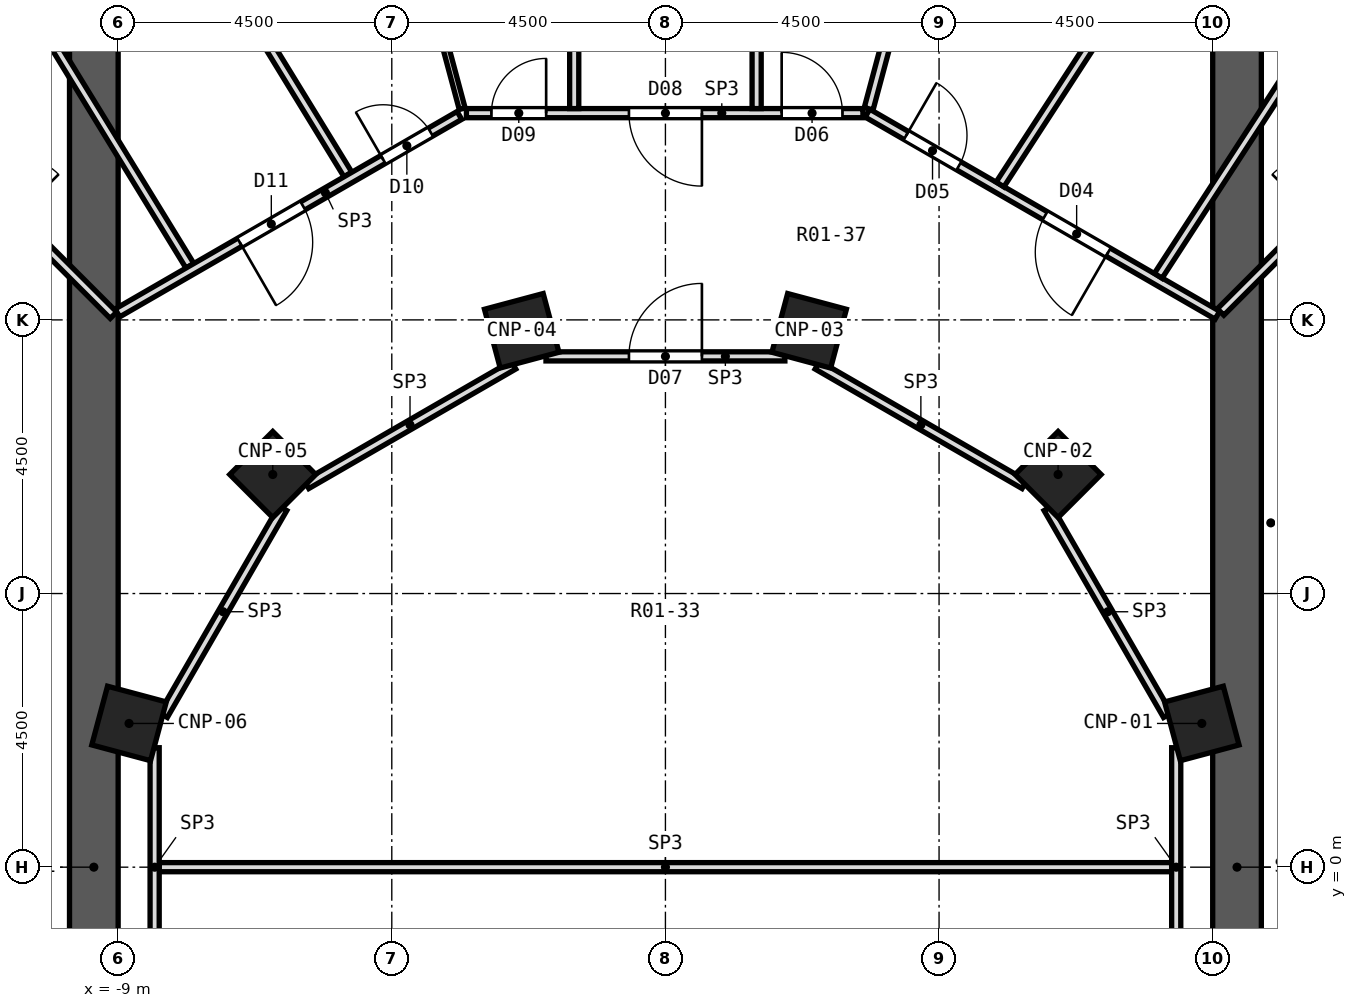
"""IFC4 building model, lengths in metres.
Left out: names, types, materials, properties, quantities, classifications, styles, units other than length and angle.
Written with IfcOpenShell. Run it as: python <this file> out.ifc"""

import sys

from ifc_helpers import new_model, si_unit, direction, frame, frame_2d, origin, origin_2d, place, context, subcontext, project, spatial, rectangle, extrude, element, fill, save


model = new_model("IFC4")
c1 = context("Model", 3, precision=1e-05, world=origin(), true_north=direction((0.0, 1.0)))
c2 = subcontext(c1, "Body", "Model", "MODEL_VIEW")
j1 = project(units=[si_unit("LENGTHUNIT", "METRE"), si_unit("PLANEANGLEUNIT", "RADIAN")], contexts=[c1])
p1 = place(None, origin())
s1 = spatial("IfcSite", under=j1, at=p1, CompositionType="ELEMENT")
p2 = place(p1, origin())
s2 = spatial("IfcBuilding", under=s1, at=p2, CompositionType="ELEMENT")
p3 = place(p2, frame((0.0, 0.0, -9.0)))
s3 = spatial("IfcBuildingStorey", under=s2, at=p3, CompositionType="ELEMENT", Elevation=-9.0)
for number, where, z_axis, x_axis in (
    (1, (8.821, 2.364, -0.3), (0.0, 0.0, 1.0), (0.966, 0.259, 0.0)),
    (2, (6.458, 6.458, -0.3), (0.0, 0.0, 1.0), (0.707, 0.707, 0.0)),
    (3, (2.364, 8.821, -0.3), (0.0, 0.0, 1.0), (0.259, 0.966, 0.0)),
    (4, (-2.364, 8.821, -0.3), (0.0, 0.0, 1.0), (-0.259, 0.966, 0.0)),
    (5, (-6.458, 6.458, -0.3), (0.0, 0.0, 1.0), (-0.707, 0.707, 0.0)),
    (6, (-8.821, 2.364, -0.3), (0.0, 0.0, 1.0), (-0.966, 0.259, 0.0)),
):
    element("IfcColumn", number, at=place(p3, frame(where, z_axis=z_axis, x_axis=x_axis)), inside=s3, PredefinedType="COLUMN", context=c2, shape_type="SweptSolid", body=[
        extrude(rectangle(XDim=1.0, YDim=1.0, at=origin_2d()), origin(), (0.0, 0.0, 1.0), 4.8),
    ])
for number, where, z_axis, x_axis in (
    (7, (9.4, -27.077, -0.3), (0.0, 0.0, 1.0), (0.0, 1.0, 0.0)),
    (8, (-9.4, -27.077, -0.3), (0.0, 0.0, 1.0), (0.0, 1.0, 0.0)),
):
    element("IfcWall", number, at=place(p3, frame(where, z_axis=z_axis, x_axis=x_axis)), inside=s3, PredefinedType="SHEAR", context=c2, shape_type="SweptSolid", body=[
        extrude(rectangle(XDim=54.154, YDim=0.8, at=frame_2d((27.077, 0.0))), origin(), (0.0, 0.0, 1.0), 4.8),
    ])
p4 = place(p3, frame((-5.702, 21.279, 0.0), z_axis=(0.0, 0.0, 1.0), x_axis=(0.258795874203, -0.965932034615, 0.0)))
e9 = element("IfcWall", 9, at=p4, inside=s3, PredefinedType="PARTITIONING", context=c2, shape_type="SweptSolid", body=[
    extrude(rectangle(XDim=9.117, YDim=0.1, at=frame_2d((4.558, 0.0))), origin(), (0.0, 0.0, 1.0), 3.95),
])
p5 = place(p3, frame((6.292, 5.902, 0.0), z_axis=(0.0, 0.0, 1.0), x_axis=(0.500061252887, -0.865990036525, 0.0)))
e10 = element("IfcWall", 10, at=p5, inside=s3, PredefinedType="PARTITIONING", context=c2, shape_type="SweptSolid", body=[
    extrude(rectangle(XDim=3.93, YDim=0.15, at=frame_2d((1.965, 0.0))), origin(), (0.0, 0.0, 1.0), 3.95),
])
p6 = place(p3, frame((-12.795, 18.009, 0.0), z_axis=(0.0, 0.0, 1.0), x_axis=(0.522436995147, -0.852677891177, 0.0)))
e11 = element("IfcWall", 11, at=p6, inside=s3, PredefinedType="PARTITIONING", context=c2, shape_type="SweptSolid", body=[
    extrude(rectangle(XDim=9.522, YDim=0.15, at=frame_2d((4.761, 0.0))), origin(), (0.0, 0.0, 1.0), 3.95),
])
p7 = place(p3, frame((-10.21, 19.532, 0.0), z_axis=(0.0, 0.0, 1.0), x_axis=(0.522490105179, -0.852645348307, 0.0)))
e12 = element("IfcWall", 12, at=p7, inside=s3, PredefinedType="PARTITIONING", context=c2, shape_type="SweptSolid", body=[
    extrude(rectangle(XDim=9.548, YDim=0.15, at=frame_2d((4.774, 0.0))), origin(), (0.0, 0.0, 1.0), 3.95),
])
p8 = place(p3, frame((-19.474, 19.474, 0.0), z_axis=(0.0, 0.0, 1.0), x_axis=(0.707106781187, -0.707106781187, 0.0)))
e13 = element("IfcWall", 13, at=p8, inside=s3, PredefinedType="PARTITIONING", context=c2, shape_type="SweptSolid", body=[
    extrude(rectangle(XDim=14.703, YDim=0.15, at=frame_2d((7.352, 0.0))), origin(), (0.0, 0.0, 1.0), 3.95),
])
p9 = place(p8, frame((11.427, 0.0, 0.0)))
e14 = element("IfcOpeningElement", 14, at=p9, cuts=e13, PredefinedType="OPENING", context=c2, shape_type="SweptSolid", body=[
    extrude(rectangle(XDim=1.0, YDim=2.1, at=frame_2d((0.5, 1.05))), frame((0.0, 0.087, 0.0), z_axis=(0.0, -1.0, 0.0), x_axis=(1.0, 0.0, 0.0)), (0.0, 0.0, 1.0), 0.174),
])
p10 = place(p3, frame((2.499, 8.257, 0.0), z_axis=(0.0, 0.0, 1.0), x_axis=(0.865990036525, -0.500061252887, 0.0)))
e15 = element("IfcWall", 15, at=p10, inside=s3, PredefinedType="PARTITIONING", context=c2, shape_type="SweptSolid", body=[
    extrude(rectangle(XDim=3.93, YDim=0.15, at=frame_2d((1.965, 0.0))), origin(), (0.0, 0.0, 1.0), 3.95),
])
p11 = place(p3, frame((3.323, 12.4, 0.0), z_axis=(0.0, 0.0, 1.0), x_axis=(0.865961614908, -0.500110469302, 0.0)))
e16 = element("IfcWall", 16, at=p11, inside=s3, PredefinedType="PARTITIONING", context=c2, shape_type="SweptSolid", body=[
    extrude(rectangle(XDim=6.645, YDim=0.15, at=frame_2d((3.322, 0.0))), origin(), (0.0, 0.0, 1.0), 3.95),
])
p12 = place(p11, frame((3.372, 0.0, 0.0)))
e17 = element("IfcOpeningElement", 17, at=p12, cuts=e16, PredefinedType="OPENING", context=c2, shape_type="SweptSolid", body=[
    extrude(rectangle(XDim=1.2, YDim=2.1, at=frame_2d((0.6, 1.05))), frame((0.0, 0.087, 0.0), z_axis=(0.0, -1.0, 0.0), x_axis=(1.0, 0.0, 0.0)), (0.0, 0.0, 1.0), 0.174),
])
p13 = place(p11, frame((0.735, 0.0, 0.0)))
e18 = element("IfcOpeningElement", 18, at=p13, cuts=e16, PredefinedType="OPENING", context=c2, shape_type="SweptSolid", body=[
    extrude(rectangle(XDim=1.0, YDim=2.1, at=frame_2d((0.5, 1.05))), frame((0.0, 0.087, 0.0), z_axis=(0.0, -1.0, 0.0), x_axis=(1.0, 0.0, 0.0)), (0.0, 0.0, 1.0), 0.174),
])
p14 = place(p3, frame((-8.325, 0.0, 0.0), z_axis=(0.0, 0.0, 1.0), x_axis=(1.0, 0.0, 0.0)))
e19 = element("IfcWall", 19, at=p14, inside=s3, PredefinedType="PARTITIONING", context=c2, shape_type="SweptSolid", body=[
    extrude(rectangle(XDim=16.65, YDim=0.15, at=frame_2d((8.325, 0.0))), origin(), (0.0, 0.0, 1.0), 3.95),
])
p15 = place(p3, frame((-1.964, 8.4, 0.0), z_axis=(0.0, 0.0, 1.0), x_axis=(1.0, 0.0, 0.0)))
e20 = element("IfcWall", 20, at=p15, inside=s3, PredefinedType="PARTITIONING", context=c2, shape_type="SweptSolid", body=[
    extrude(rectangle(XDim=3.929, YDim=0.15, at=frame_2d((1.964, 0.0))), origin(), (0.0, 0.0, 1.0), 3.95),
])
p16 = place(p15, frame((1.365, 0.0, 0.0)))
e21 = element("IfcOpeningElement", 21, at=p16, cuts=e20, PredefinedType="OPENING", context=c2, shape_type="SweptSolid", body=[
    extrude(rectangle(XDim=1.2, YDim=2.1, at=frame_2d((0.6, 1.05))), frame((0.0, 0.087, 0.0), z_axis=(0.0, -1.0, 0.0), x_axis=(1.0, 0.0, 0.0)), (0.0, 0.0, 1.0), 0.174),
])
p17 = place(p3, frame((-3.273, 12.4, 0.0), z_axis=(0.0, 0.0, 1.0), x_axis=(1.0, 0.0, 0.0)))
e22 = element("IfcWall", 22, at=p17, inside=s3, PredefinedType="PARTITIONING", context=c2, shape_type="SweptSolid", body=[
    extrude(rectangle(XDim=6.521, YDim=0.15, at=frame_2d((3.26, 0.0))), origin(), (0.0, 0.0, 1.0), 3.95),
])
p18 = place(p17, frame((5.185, 0.0, 0.0)))
e23 = element("IfcOpeningElement", 23, at=p18, cuts=e22, PredefinedType="OPENING", context=c2, shape_type="SweptSolid", body=[
    extrude(rectangle(XDim=1.0, YDim=2.1, at=frame_2d((0.5, 1.05))), frame((0.0, 0.087, 0.0), z_axis=(0.0, -1.0, 0.0), x_axis=(1.0, 0.0, 0.0)), (0.0, 0.0, 1.0), 0.174),
])
p19 = place(p17, frame((2.673, 0.0, 0.0)))
e24 = element("IfcOpeningElement", 24, at=p19, cuts=e22, PredefinedType="OPENING", context=c2, shape_type="SweptSolid", body=[
    extrude(rectangle(XDim=1.2, YDim=2.1, at=frame_2d((0.6, 1.05))), frame((0.0, 0.087, 0.0), z_axis=(0.0, -1.0, 0.0), x_axis=(1.0, 0.0, 0.0)), (0.0, 0.0, 1.0), 0.174),
])
p20 = place(p17, frame((0.412, 0.0, 0.0)))
e25 = element("IfcOpeningElement", 25, at=p20, cuts=e22, PredefinedType="OPENING", context=c2, shape_type="SweptSolid", body=[
    extrude(rectangle(XDim=0.9, YDim=2.1, at=frame_2d((0.45, 1.05))), frame((0.0, 0.087, 0.0), z_axis=(0.0, -1.0, 0.0), x_axis=(1.0, 0.0, 0.0)), (0.0, 0.0, 1.0), 0.174),
])
p21 = place(p3, frame((-5.902, 6.292, 0.0), z_axis=(0.0, 0.0, 1.0), x_axis=(0.865990036525, 0.500061252887, 0.0)))
e26 = element("IfcWall", 26, at=p21, inside=s3, PredefinedType="PARTITIONING", context=c2, shape_type="SweptSolid", body=[
    extrude(rectangle(XDim=3.93, YDim=0.15, at=frame_2d((1.965, 0.0))), origin(), (0.0, 0.0, 1.0), 3.95),
])
p22 = place(p3, frame((-9.012, 9.115, 0.0), z_axis=(0.0, 0.0, 1.0), x_axis=(0.865967095912, 0.5001009786, 0.0)))
e27 = element("IfcWall", 27, at=p22, inside=s3, PredefinedType="PARTITIONING", context=c2, shape_type="SweptSolid", body=[
    extrude(rectangle(XDim=6.495, YDim=0.15, at=frame_2d((3.248, 0.0))), origin(), (0.0, 0.0, 1.0), 3.95),
])
p23 = place(p22, frame((5.046, 0.0, 0.0)))
e28 = element("IfcOpeningElement", 28, at=p23, cuts=e27, PredefinedType="OPENING", context=c2, shape_type="SweptSolid", body=[
    extrude(rectangle(XDim=0.9, YDim=2.1, at=frame_2d((0.45, 1.05))), frame((0.0, 0.087, 0.0), z_axis=(0.0, -1.0, 0.0), x_axis=(1.0, 0.0, 0.0)), (0.0, 0.0, 1.0), 0.174),
])
p24 = place(p22, frame((2.323, 0.0, 0.0)))
e29 = element("IfcOpeningElement", 29, at=p24, cuts=e27, PredefinedType="OPENING", context=c2, shape_type="SweptSolid", body=[
    extrude(rectangle(XDim=1.2, YDim=2.1, at=frame_2d((0.6, 1.05))), frame((0.0, 0.087, 0.0), z_axis=(0.0, -1.0, 0.0), x_axis=(1.0, 0.0, 0.0)), (0.0, 0.0, 1.0), 0.174),
])
p25 = place(p3, frame((9.13, 9.13, 0.0), z_axis=(0.0, 0.0, 1.0), x_axis=(0.707106781187, 0.707106781187, 0.0)))
e30 = element("IfcWall", 30, at=p25, inside=s3, PredefinedType="PARTITIONING", context=c2, shape_type="SweptSolid", body=[
    extrude(rectangle(XDim=14.628, YDim=0.15, at=frame_2d((7.314, 0.0))), origin(), (0.0, 0.0, 1.0), 3.95),
])
p26 = place(p25, frame((2.201, 0.0, 0.0)))
e31 = element("IfcOpeningElement", 31, at=p26, cuts=e30, PredefinedType="OPENING", context=c2, shape_type="SweptSolid", body=[
    extrude(rectangle(XDim=1.0, YDim=2.1, at=frame_2d((0.5, 1.05))), frame((0.0, 0.087, 0.0), z_axis=(0.0, -1.0, 0.0), x_axis=(1.0, 0.0, 0.0)), (0.0, 0.0, 1.0), 0.174),
])
p27 = place(p3, frame((8.104, 9.725, 0.0), z_axis=(0.0, 0.0, 1.0), x_axis=(0.54464977912, 0.838663590544, 0.0)))
e32 = element("IfcWall", 32, at=p27, inside=s3, PredefinedType="PARTITIONING", context=c2, shape_type="SweptSolid", body=[
    extrude(rectangle(XDim=9.658, YDim=0.15, at=frame_2d((4.829, 0.0))), origin(), (0.0, 0.0, 1.0), 3.95),
])
p28 = place(p3, frame((5.503, 11.228, 0.0), z_axis=(0.0, 0.0, 1.0), x_axis=(0.544640091629, 0.838669881772, 0.0)))
e33 = element("IfcWall", 33, at=p28, inside=s3, PredefinedType="PARTITIONING", context=c2, shape_type="SweptSolid", body=[
    extrude(rectangle(XDim=9.784, YDim=0.15, at=frame_2d((4.892, 0.0))), origin(), (0.0, 0.0, 1.0), 3.95),
])
p29 = place(p3, frame((-8.257, 2.499, 0.0), z_axis=(0.0, 0.0, 1.0), x_axis=(0.500061252887, 0.865990036525, 0.0)))
e34 = element("IfcWall", 34, at=p29, inside=s3, PredefinedType="PARTITIONING", context=c2, shape_type="SweptSolid", body=[
    extrude(rectangle(XDim=3.93, YDim=0.15, at=frame_2d((1.965, 0.0))), origin(), (0.0, 0.0, 1.0), 3.95),
])
p30 = place(p3, frame((3.342, 12.472, 0.0), z_axis=(0.0, 0.0, 1.0), x_axis=(0.258787532185, 0.965934269599, 0.0)))
e35 = element("IfcWall", 35, at=p30, inside=s3, PredefinedType="PARTITIONING", context=c2, shape_type="SweptSolid", body=[
    extrude(rectangle(XDim=14.627, YDim=0.15, at=frame_2d((7.314, 0.0))), origin(), (0.0, 0.0, 1.0), 3.95),
])
p31 = place(p3, frame((8.4, -1.964, 0.0), z_axis=(0.0, 0.0, 1.0), x_axis=(0.0, 1.0, 0.0)))
e36 = element("IfcWall", 36, at=p31, inside=s3, PredefinedType="PARTITIONING", context=c2, shape_type="SweptSolid", body=[
    extrude(rectangle(XDim=3.929, YDim=0.15, at=frame_2d((1.964, 0.0))), origin(), (0.0, 0.0, 1.0), 3.95),
])
for number, where, z_axis, x_axis in (
    (37, (1.5, 12.475, 0.0), (0.0, 0.0, 1.0), (0.0, 1.0, 0.0)),
    (38, (-1.5, 12.475, 0.0), (0.0, 0.0, 1.0), (0.0, 1.0, 0.0)),
):
    element("IfcWall", number, at=place(p3, frame(where, z_axis=z_axis, x_axis=x_axis)), inside=s3, PredefinedType="PARTITIONING", context=c2, shape_type="SweptSolid", body=[
        extrude(rectangle(XDim=10.37, YDim=0.15, at=frame_2d((5.185, 0.0))), origin(), (0.0, 0.0, 1.0), 3.95),
    ])
p32 = place(p3, frame((-8.4, -1.964, 0.0), z_axis=(0.0, 0.0, 1.0), x_axis=(0.0, 1.0, 0.0)))
e39 = element("IfcWall", 39, at=p32, inside=s3, PredefinedType="PARTITIONING", context=c2, shape_type="SweptSolid", body=[
    extrude(rectangle(XDim=3.929, YDim=0.15, at=frame_2d((1.964, 0.0))), origin(), (0.0, 0.0, 1.0), 3.95),
])
p33 = place(p12, frame((1.2, 0.0, 0.0), z_axis=(0.0, 0.0, 1.0), x_axis=(-1.0, 0.0, 0.0)))
e40 = element("IfcDoor", 40, at=p33, inside=s3, OperationType="SINGLE_SWING_LEFT", PredefinedType="DOOR", context=c2, shape_type="SweptSolid", body=[
    extrude(rectangle(XDim=1.2, YDim=2.1, at=frame_2d((0.6, 1.05))), frame((0.0, 0.025, 0.0), z_axis=(0.0, -1.0, 0.0), x_axis=(1.0, 0.0, 0.0)), (0.0, 0.0, 1.0), 0.05),
])
fill(e17, e40)
p34 = place(p13, origin())
e41 = element("IfcDoor", 41, at=p34, inside=s3, OperationType="SINGLE_SWING_LEFT", PredefinedType="DOOR", context=c2, shape_type="SweptSolid", body=[
    extrude(rectangle(XDim=1.0, YDim=2.1, at=frame_2d((0.5, 1.05))), frame((0.0, 0.025, 0.0), z_axis=(0.0, -1.0, 0.0), x_axis=(1.0, 0.0, 0.0)), (0.0, 0.0, 1.0), 0.05),
])
fill(e18, e41)
p35 = place(p18, origin())
e42 = element("IfcDoor", 42, at=p35, inside=s3, OperationType="SINGLE_SWING_LEFT", PredefinedType="DOOR", context=c2, shape_type="SweptSolid", body=[
    extrude(rectangle(XDim=1.0, YDim=2.1, at=frame_2d((0.5, 1.05))), frame((0.0, 0.025, 0.0), z_axis=(0.0, -1.0, 0.0), x_axis=(1.0, 0.0, 0.0)), (0.0, 0.0, 1.0), 0.05),
])
fill(e23, e42)
p36 = place(p16, origin())
e43 = element("IfcDoor", 43, at=p36, inside=s3, OperationType="SINGLE_SWING_RIGHT", PredefinedType="DOOR", context=c2, shape_type="SweptSolid", body=[
    extrude(rectangle(XDim=1.2, YDim=2.1, at=frame_2d((0.6, 1.05))), frame((0.0, 0.025, 0.0), z_axis=(0.0, -1.0, 0.0), x_axis=(1.0, 0.0, 0.0)), (0.0, 0.0, 1.0), 0.05),
])
fill(e21, e43)
p37 = place(p19, frame((1.2, 0.0, 0.0), z_axis=(0.0, 0.0, 1.0), x_axis=(-1.0, 0.0, 0.0)))
e44 = element("IfcDoor", 44, at=p37, inside=s3, OperationType="SINGLE_SWING_LEFT", PredefinedType="DOOR", context=c2, shape_type="SweptSolid", body=[
    extrude(rectangle(XDim=1.2, YDim=2.1, at=frame_2d((0.6, 1.05))), frame((0.0, 0.025, 0.0), z_axis=(0.0, -1.0, 0.0), x_axis=(1.0, 0.0, 0.0)), (0.0, 0.0, 1.0), 0.05),
])
fill(e24, e44)
p38 = place(p20, origin())
e45 = element("IfcDoor", 45, at=p38, inside=s3, OperationType="SINGLE_SWING_RIGHT", PredefinedType="DOOR", context=c2, shape_type="SweptSolid", body=[
    extrude(rectangle(XDim=0.9, YDim=2.1, at=frame_2d((0.45, 1.05))), frame((0.0, 0.025, 0.0), z_axis=(0.0, -1.0, 0.0), x_axis=(1.0, 0.0, 0.0)), (0.0, 0.0, 1.0), 0.05),
])
fill(e25, e45)
p39 = place(p23, origin())
e46 = element("IfcDoor", 46, at=p39, inside=s3, OperationType="SINGLE_SWING_LEFT", PredefinedType="DOOR", context=c2, shape_type="SweptSolid", body=[
    extrude(rectangle(XDim=0.9, YDim=2.1, at=frame_2d((0.45, 1.05))), frame((0.0, 0.025, 0.0), z_axis=(0.0, -1.0, 0.0), x_axis=(1.0, 0.0, 0.0)), (0.0, 0.0, 1.0), 0.05),
])
fill(e28, e46)
p40 = place(p24, frame((1.2, 0.0, 0.0), z_axis=(0.0, 0.0, 1.0), x_axis=(-1.0, 0.0, 0.0)))
e47 = element("IfcDoor", 47, at=p40, inside=s3, OperationType="SINGLE_SWING_RIGHT", PredefinedType="DOOR", context=c2, shape_type="SweptSolid", body=[
    extrude(rectangle(XDim=1.2, YDim=2.1, at=frame_2d((0.6, 1.05))), frame((0.0, 0.025, 0.0), z_axis=(0.0, -1.0, 0.0), x_axis=(1.0, 0.0, 0.0)), (0.0, 0.0, 1.0), 0.05),
])
fill(e29, e47)
save(model, sys.argv[1])
